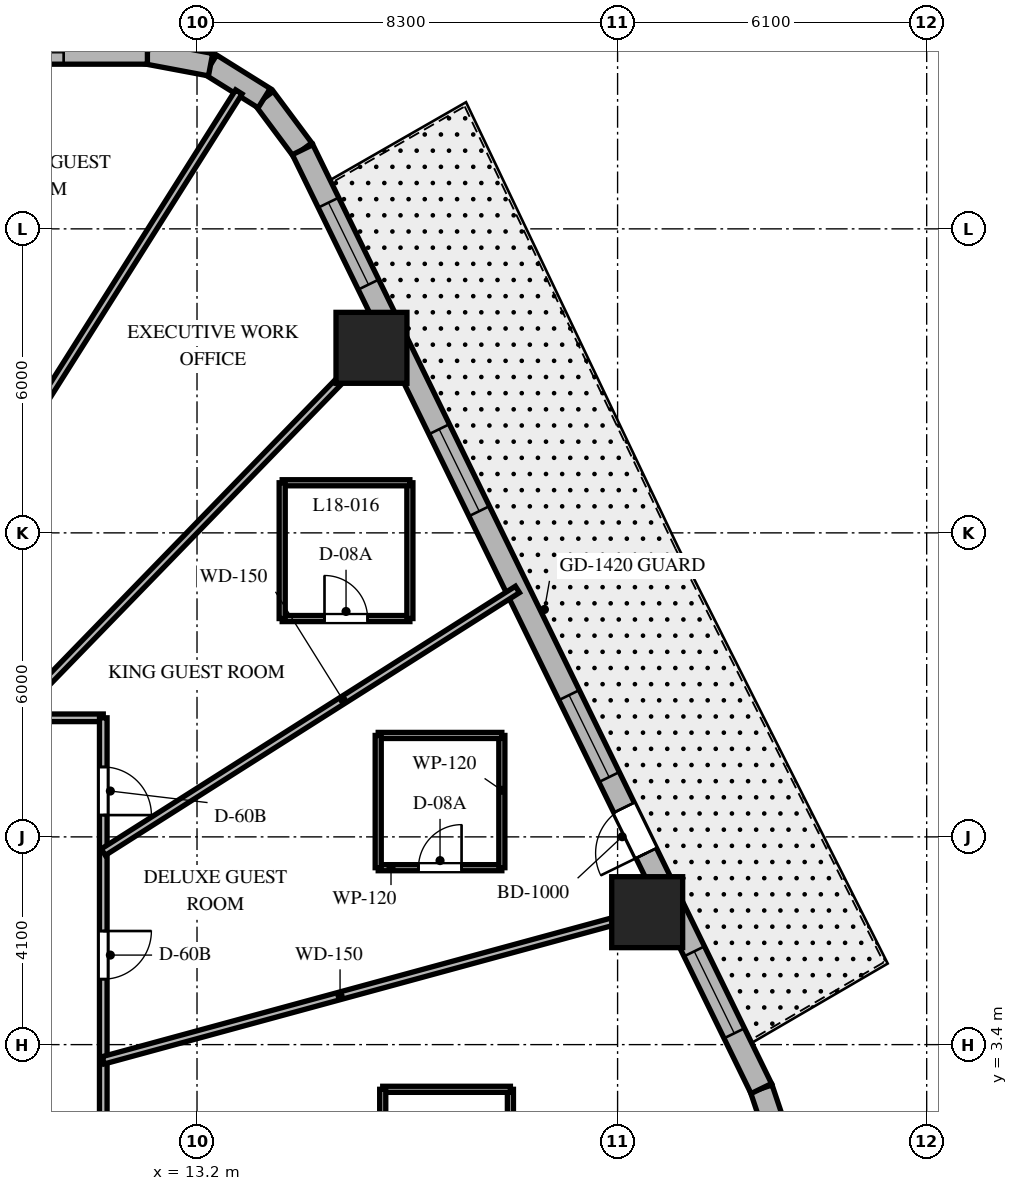
"""IFC4 building model, lengths in metres.
Left out: names, types, materials, properties, quantities, classifications, styles, units other than length and angle.
Written with IfcOpenShell. Run it as: python <this file> out.ifc"""

import sys

from ifc_helpers import new_model, si_unit, direction, frame, frame_2d, origin, origin_2d, place, context, subcontext, project, spatial, rectangle, extrude, element, fill, save


model = new_model("IFC4")
c1 = context("Model", 3, precision=1e-05, world=origin(), true_north=direction((0.0, 1.0)))
c2 = subcontext(c1, "Body", "Model", "MODEL_VIEW")
j1 = project(units=[si_unit("LENGTHUNIT", "METRE"), si_unit("PLANEANGLEUNIT", "RADIAN")], contexts=[c1])
p1 = place(None, origin())
s1 = spatial("IfcSite", under=j1, at=p1, CompositionType="ELEMENT")
p2 = place(p1, origin())
s2 = spatial("IfcBuilding", under=s1, at=p2, CompositionType="ELEMENT")
p3 = place(p2, frame((0.0, 0.0, 78.6)))
s3 = spatial("IfcBuildingStorey", under=s2, at=p3, CompositionType="ELEMENT", Elevation=78.6)
for number, where, z_axis, x_axis in (
    (1, (22.084, 6.014, 0.0), (0.0, 0.0, 1.0), (1.0, 0.0, 0.0)),
    (2, (16.643, 17.152, 0.0), (0.0, 0.0, 1.0), (1.0, 0.0, 0.0)),
):
    element("IfcColumn", number, at=place(p3, frame(where, z_axis=z_axis, x_axis=x_axis)), inside=s3, PredefinedType="COLUMN", context=c2, shape_type="SweptSolid", body=[
        extrude(rectangle(XDim=1.4, YDim=1.4, at=origin_2d()), origin(), (0.0, 0.0, 1.0), 3.7),
    ])
p4 = place(p3, frame((24.621, 1.682, 0.0), z_axis=(0.0, 0.0, 1.0), x_axis=(-0.317697451681, 0.948192137278, 0.0)))
e3 = element("IfcWall", 3, at=p4, inside=s3, PredefinedType="SOLIDWALL", context=c2, shape_type="SweptSolid", body=[
    extrude(rectangle(XDim=0.897, YDim=0.45, at=frame_2d((0.448, 0.0))), origin(), (0.0, 0.0, 1.0), 3.4),
])
p5 = place(p3, frame((15.284, 21.062, 0.0), z_axis=(0.0, 0.0, 1.0), x_axis=(-0.597595366449, 0.801797841104, 0.0)))
e4 = element("IfcWall", 4, at=p5, inside=s3, PredefinedType="SOLIDWALL", context=c2, shape_type="SweptSolid", body=[
    extrude(rectangle(XDim=1.269, YDim=0.45, at=frame_2d((0.634, 0.0))), origin(), (0.0, 0.0, 1.0), 3.4),
])
p6 = place(p3, frame((14.526, 22.08, 0.0), z_axis=(0.0, 0.0, 1.0), x_axis=(-0.848185203596, 0.529699783275, 0.0)))
e5 = element("IfcWall", 5, at=p6, inside=s3, PredefinedType="SOLIDWALL", context=c2, shape_type="SweptSolid", body=[
    extrude(rectangle(XDim=1.247, YDim=0.45, at=frame_2d((0.624, 0.0))), origin(), (0.0, 0.0, 1.0), 3.4),
])
p7 = place(p3, frame((13.468, 22.74, 0.0), z_axis=(0.0, 0.0, 1.0), x_axis=(-0.982717174228, 0.185113358451, 0.0)))
e6 = element("IfcWall", 6, at=p7, inside=s3, PredefinedType="SOLIDWALL", context=c2, shape_type="SweptSolid", body=[
    extrude(rectangle(XDim=1.269, YDim=0.45, at=frame_2d((0.634, 0.0))), origin(), (0.0, 0.0, 1.0), 3.4),
])
p8 = place(p3, frame((24.336, 2.532, 0.0), z_axis=(0.0, 0.0, 1.0), x_axis=(-0.438931326393, 0.898520612291, 0.0)))
e7 = element("IfcWall", 7, at=p8, inside=s3, PredefinedType="SOLIDWALL", context=c2, shape_type="SweptSolid", body=[
    extrude(rectangle(XDim=20.623, YDim=0.45, at=frame_2d((10.312, 0.0))), origin(), (0.0, 0.0, 1.0), 3.4),
])
p9 = place(p8, frame((5.171, 0.0, 0.0)))
e8 = element("IfcOpeningElement", 8, at=p9, cuts=e7, PredefinedType="OPENING", context=c2, shape_type="SweptSolid", body=[
    extrude(rectangle(XDim=1.0, YDim=2.15, at=frame_2d((0.5, 1.075))), frame((0.0, 0.235, 0.0), z_axis=(0.0, -1.0, 0.0), x_axis=(1.0, 0.0, 0.0)), (0.0, 0.0, 1.0), 0.47),
])
p10 = place(p8, frame((6.842, 0.0, 0.8)))
e9 = element("IfcOpeningElement", 9, at=p10, cuts=e7, PredefinedType="OPENING", context=c2, shape_type="SweptSolid", body=[
    extrude(rectangle(XDim=1.8, YDim=1.8, at=frame_2d((0.9, 0.9))), frame((0.0, 0.235, 0.0), z_axis=(0.0, -1.0, 0.0), x_axis=(1.0, 0.0, 0.0)), (0.0, 0.0, 1.0), 0.47),
])
p11 = place(p8, frame((12.683, 0.0, 0.8)))
e10 = element("IfcOpeningElement", 10, at=p11, cuts=e7, PredefinedType="OPENING", context=c2, shape_type="SweptSolid", body=[
    extrude(rectangle(XDim=1.8, YDim=1.8, at=frame_2d((0.9, 0.9))), frame((0.0, 0.235, 0.0), z_axis=(0.0, -1.0, 0.0), x_axis=(1.0, 0.0, 0.0)), (0.0, 0.0, 1.0), 0.47),
])
p12 = place(p8, frame((17.66, 0.0, 0.8)))
e11 = element("IfcOpeningElement", 11, at=p12, cuts=e7, PredefinedType="OPENING", context=c2, shape_type="SweptSolid", body=[
    extrude(rectangle(XDim=1.8, YDim=1.8, at=frame_2d((0.9, 0.9))), frame((0.0, 0.235, 0.0), z_axis=(0.0, -1.0, 0.0), x_axis=(1.0, 0.0, 0.0)), (0.0, 0.0, 1.0), 0.47),
])
p13 = place(p8, frame((1.214, 0.0, 0.8)))
e12 = element("IfcOpeningElement", 12, at=p13, cuts=e7, PredefinedType="OPENING", context=c2, shape_type="SweptSolid", body=[
    extrude(rectangle(XDim=1.8, YDim=1.8, at=frame_2d((0.9, 0.9))), frame((0.0, 0.235, 0.0), z_axis=(0.0, -1.0, 0.0), x_axis=(1.0, 0.0, 0.0)), (0.0, 0.0, 1.0), 0.47),
])
p14 = place(p3, frame((12.221, 22.975, 0.0), z_axis=(0.0, 0.0, 1.0), x_axis=(-1.0, 0.0, 0.0)))
e13 = element("IfcWall", 13, at=p14, inside=s3, PredefinedType="SOLIDWALL", context=c2, shape_type="SweptSolid", body=[
    extrude(rectangle(XDim=26.389, YDim=0.45, at=frame_2d((13.195, 0.0))), origin(), (0.0, 0.0, 1.0), 3.4),
])
p15 = place(p14, frame((1.653, 0.0, 0.8)))
e14 = element("IfcOpeningElement", 14, at=p15, cuts=e13, PredefinedType="OPENING", context=c2, shape_type="SweptSolid", body=[
    extrude(rectangle(XDim=1.8, YDim=1.8, at=frame_2d((0.9, 0.9))), frame((0.0, 0.235, 0.0), z_axis=(0.0, -1.0, 0.0), x_axis=(1.0, 0.0, 0.0)), (0.0, 0.0, 1.0), 0.47),
])
p16 = place(p14, frame((12.296, 0.0, 0.8)))
e15 = element("IfcOpeningElement", 15, at=p16, cuts=e13, PredefinedType="OPENING", context=c2, shape_type="SweptSolid", body=[
    extrude(rectangle(XDim=1.8, YDim=1.8, at=frame_2d((0.9, 0.9))), frame((0.0, 0.235, 0.0), z_axis=(0.0, -1.0, 0.0), x_axis=(1.0, 0.0, 0.0)), (0.0, 0.0, 1.0), 0.47),
])
p17 = place(p14, frame((22.938, 0.0, 0.8)))
e16 = element("IfcOpeningElement", 16, at=p17, cuts=e13, PredefinedType="OPENING", context=c2, shape_type="SweptSolid", body=[
    extrude(rectangle(XDim=1.8, YDim=1.8, at=frame_2d((0.9, 0.9))), frame((0.0, 0.235, 0.0), z_axis=(0.0, -1.0, 0.0), x_axis=(1.0, 0.0, 0.0)), (0.0, 0.0, 1.0), 0.47),
])
p18 = place(p3, frame((-11.35, 9.85, 0.0), z_axis=(0.0, 0.0, 1.0), x_axis=(1.0, 0.0, 0.0)))
e17 = element("IfcWall", 17, at=p18, inside=s3, PredefinedType="PARTITIONING", context=c2, shape_type="SweptSolid", body=[
    extrude(rectangle(XDim=22.7, YDim=0.15, at=frame_2d((11.35, 0.0))), origin(), (0.0, 0.0, 1.0), 2.84),
])
p19 = place(p18, frame((18.837, 0.0, 0.0)))
e18 = element("IfcOpeningElement", 18, at=p19, cuts=e17, PredefinedType="OPENING", context=c2, shape_type="SweptSolid", body=[
    extrude(rectangle(XDim=0.9, YDim=2.03, at=frame_2d((0.45, 1.015))), frame((0.0, 0.085, 0.0), z_axis=(0.0, -1.0, 0.0), x_axis=(1.0, 0.0, 0.0)), (0.0, 0.0, 1.0), 0.17),
])
p20 = place(p18, frame((15.532, 0.0, 0.0)))
e19 = element("IfcOpeningElement", 19, at=p20, cuts=e17, PredefinedType="OPENING", context=c2, shape_type="SweptSolid", body=[
    extrude(rectangle(XDim=0.95, YDim=2.03, at=frame_2d((0.475, 1.015))), frame((0.0, 0.085, 0.0), z_axis=(0.0, -1.0, 0.0), x_axis=(1.0, 0.0, 0.0)), (0.0, 0.0, 1.0), 0.17),
])
p21 = place(p18, frame((10.444, 0.0, 0.0)))
e20 = element("IfcOpeningElement", 20, at=p21, cuts=e17, PredefinedType="OPENING", context=c2, shape_type="SweptSolid", body=[
    extrude(rectangle(XDim=0.95, YDim=2.03, at=frame_2d((0.475, 1.015))), frame((0.0, 0.085, 0.0), z_axis=(0.0, -1.0, 0.0), x_axis=(1.0, 0.0, 0.0)), (0.0, 0.0, 1.0), 0.17),
])
p22 = place(p18, frame((3.369, 0.0, 0.0)))
e21 = element("IfcOpeningElement", 21, at=p22, cuts=e17, PredefinedType="OPENING", context=c2, shape_type="SweptSolid", body=[
    extrude(rectangle(XDim=0.95, YDim=2.03, at=frame_2d((0.475, 1.015))), frame((0.0, 0.085, 0.0), z_axis=(0.0, -1.0, 0.0), x_axis=(1.0, 0.0, 0.0)), (0.0, 0.0, 1.0), 0.17),
])
p23 = place(p3, frame((11.35, 9.85, 0.0), z_axis=(0.0, 0.0, 1.0), x_axis=(0.0, -1.0, 0.0)))
e22 = element("IfcWall", 22, at=p23, inside=s3, PredefinedType="PARTITIONING", context=c2, shape_type="SweptSolid", body=[
    extrude(rectangle(XDim=19.7, YDim=0.15, at=frame_2d((9.85, 0.0))), origin(), (0.0, 0.0, 1.0), 2.84),
])
p24 = place(p23, frame((4.208, 0.0, 0.0)))
e23 = element("IfcOpeningElement", 23, at=p24, cuts=e22, PredefinedType="OPENING", context=c2, shape_type="SweptSolid", body=[
    extrude(rectangle(XDim=0.95, YDim=2.03, at=frame_2d((0.475, 1.015))), frame((0.0, 0.085, 0.0), z_axis=(0.0, -1.0, 0.0), x_axis=(1.0, 0.0, 0.0)), (0.0, 0.0, 1.0), 0.17),
])
p25 = place(p23, frame((0.97, 0.0, 0.0)))
e24 = element("IfcOpeningElement", 24, at=p25, cuts=e22, PredefinedType="OPENING", context=c2, shape_type="SweptSolid", body=[
    extrude(rectangle(XDim=0.95, YDim=2.03, at=frame_2d((0.475, 1.015))), frame((0.0, 0.085, 0.0), z_axis=(0.0, -1.0, 0.0), x_axis=(1.0, 0.0, 0.0)), (0.0, 0.0, 1.0), 0.17),
])
p26 = place(p23, frame((17.181, 0.0, 0.0)))
e25 = element("IfcOpeningElement", 25, at=p26, cuts=e22, PredefinedType="OPENING", context=c2, shape_type="SweptSolid", body=[
    extrude(rectangle(XDim=0.95, YDim=2.03, at=frame_2d((0.475, 1.015))), frame((0.0, 0.085, 0.0), z_axis=(0.0, -1.0, 0.0), x_axis=(1.0, 0.0, 0.0)), (0.0, 0.0, 1.0), 0.17),
])
p27 = place(p23, frame((13.403, 0.0, 0.0)))
e26 = element("IfcOpeningElement", 26, at=p27, cuts=e22, PredefinedType="OPENING", context=c2, shape_type="SweptSolid", body=[
    extrude(rectangle(XDim=0.95, YDim=2.03, at=frame_2d((0.475, 1.015))), frame((0.0, 0.085, 0.0), z_axis=(0.0, -1.0, 0.0), x_axis=(1.0, 0.0, 0.0)), (0.0, 0.0, 1.0), 0.17),
])
p28 = place(p23, frame((8.838, 0.0, 0.0)))
e27 = element("IfcOpeningElement", 27, at=p28, cuts=e22, PredefinedType="OPENING", context=c2, shape_type="SweptSolid", body=[
    extrude(rectangle(XDim=0.95, YDim=2.03, at=frame_2d((0.475, 1.015))), frame((0.0, 0.085, 0.0), z_axis=(0.0, -1.0, 0.0), x_axis=(1.0, 0.0, 0.0)), (0.0, 0.0, 1.0), 0.17),
])
p29 = place(p3, frame((11.35, 3.091, 0.0), z_axis=(0.0, 0.0, 1.0), x_axis=(0.964859685283, 0.262765651704, 0.0)))
e28 = element("IfcWall", 28, at=p29, inside=s3, PredefinedType="PARTITIONING", context=c2, shape_type="SweptSolid", body=[
    extrude(rectangle(XDim=11.629, YDim=0.15, at=frame_2d((5.814, 0.0))), origin(), (0.0, 0.0, 1.0), 2.54),
])
p30 = place(p3, frame((11.35, 7.199, 0.0), z_axis=(0.0, 0.0, 1.0), x_axis=(0.844458213289, 0.535621439087, 0.0)))
e29 = element("IfcWall", 29, at=p30, inside=s3, PredefinedType="PARTITIONING", context=c2, shape_type="SweptSolid", body=[
    extrude(rectangle(XDim=9.679, YDim=0.15, at=frame_2d((4.84, 0.0))), origin(), (0.0, 0.0, 1.0), 2.54),
])
p31 = place(p3, frame((9.558, 9.85, 0.0), z_axis=(0.0, 0.0, 1.0), x_axis=(0.69638346089, 0.717669893056, 0.0)))
e30 = element("IfcWall", 30, at=p31, inside=s3, PredefinedType="PARTITIONING", context=c2, shape_type="SweptSolid", body=[
    extrude(rectangle(XDim=10.701, YDim=0.15, at=frame_2d((5.351, 0.0))), origin(), (0.0, 0.0, 1.0), 2.54),
])
p32 = place(p3, frame((6.222, 9.85, 0.0), z_axis=(0.0, 0.0, 1.0), x_axis=(0.534069056435, 0.845440857162, 0.0)))
e31 = element("IfcWall", 31, at=p32, inside=s3, PredefinedType="PARTITIONING", context=c2, shape_type="SweptSolid", body=[
    extrude(rectangle(XDim=14.611, YDim=0.15, at=frame_2d((7.306, 0.0))), origin(), (0.0, 0.0, 1.0), 2.54),
])
p33 = place(p3, frame((16.776, 6.892, 0.0), z_axis=(0.0, 0.0, 1.0), x_axis=(1.0, 0.0, 0.0)))
e32 = element("IfcWall", 32, at=p33, inside=s3, PredefinedType="PARTITIONING", context=c2, shape_type="SweptSolid", body=[
    extrude(rectangle(XDim=2.44, YDim=0.12, at=frame_2d((1.22, 0.0))), origin(), (0.0, 0.0, 1.0), 2.927),
])
p34 = place(p33, frame((0.795, 0.0, 0.0)))
e33 = element("IfcOpeningElement", 33, at=p34, cuts=e32, PredefinedType="OPENING", context=c2, shape_type="SweptSolid", body=[
    extrude(rectangle(XDim=0.85, YDim=2.03, at=frame_2d((0.425, 1.015))), frame((0.0, 0.07, 0.0), z_axis=(0.0, -1.0, 0.0), x_axis=(1.0, 0.0, 0.0)), (0.0, 0.0, 1.0), 0.14),
])
p35 = place(p3, frame((19.216, 6.892, 0.0), z_axis=(0.0, 0.0, 1.0), x_axis=(0.0, 1.0, 0.0)))
e34 = element("IfcWall", 34, at=p35, inside=s3, PredefinedType="PARTITIONING", context=c2, shape_type="SweptSolid", body=[
    extrude(rectangle(XDim=2.61, YDim=0.12, at=frame_2d((1.305, 0.0))), origin(), (0.0, 0.0, 1.0), 3.4),
])
p36 = place(p3, frame((19.216, 9.502, 0.0), z_axis=(0.0, 0.0, 1.0), x_axis=(-1.0, 0.0, 0.0)))
e35 = element("IfcWall", 35, at=p36, inside=s3, PredefinedType="PARTITIONING", context=c2, shape_type="SweptSolid", body=[
    extrude(rectangle(XDim=2.44, YDim=0.12, at=frame_2d((1.22, 0.0))), origin(), (0.0, 0.0, 1.0), 3.4),
])
p37 = place(p3, frame((16.776, 9.502, 0.0), z_axis=(0.0, 0.0, 1.0), x_axis=(0.0, -1.0, 0.0)))
e36 = element("IfcWall", 36, at=p37, inside=s3, PredefinedType="PARTITIONING", context=c2, shape_type="SweptSolid", body=[
    extrude(rectangle(XDim=2.61, YDim=0.12, at=frame_2d((1.305, 0.0))), origin(), (0.0, 0.0, 1.0), 2.927),
])
p38 = place(p3, frame((14.881, 11.809, 0.0), z_axis=(0.0, 0.0, 1.0), x_axis=(1.0, 0.0, 0.0)))
e37 = element("IfcWall", 37, at=p38, inside=s3, PredefinedType="PARTITIONING", context=c2, shape_type="SweptSolid", body=[
    extrude(rectangle(XDim=2.52, YDim=0.12, at=frame_2d((1.26, 0.0))), origin(), (0.0, 0.0, 1.0), 2.927),
])
p39 = place(p38, frame((0.835, 0.0, 0.0)))
e38 = element("IfcOpeningElement", 38, at=p39, cuts=e37, PredefinedType="OPENING", context=c2, shape_type="SweptSolid", body=[
    extrude(rectangle(XDim=0.85, YDim=2.03, at=frame_2d((0.425, 1.015))), frame((0.0, 0.07, 0.0), z_axis=(0.0, -1.0, 0.0), x_axis=(1.0, 0.0, 0.0)), (0.0, 0.0, 1.0), 0.14),
])
p40 = place(p3, frame((17.401, 11.809, 0.0), z_axis=(0.0, 0.0, 1.0), x_axis=(0.0, 1.0, 0.0)))
e39 = element("IfcWall", 39, at=p40, inside=s3, PredefinedType="PARTITIONING", context=c2, shape_type="SweptSolid", body=[
    extrude(rectangle(XDim=2.68, YDim=0.12, at=frame_2d((1.34, 0.0))), origin(), (0.0, 0.0, 1.0), 3.4),
])
p41 = place(p3, frame((17.401, 14.489, 0.0), z_axis=(0.0, 0.0, 1.0), x_axis=(-1.0, 0.0, 0.0)))
e40 = element("IfcWall", 40, at=p41, inside=s3, PredefinedType="PARTITIONING", context=c2, shape_type="SweptSolid", body=[
    extrude(rectangle(XDim=2.52, YDim=0.12, at=frame_2d((1.26, 0.0))), origin(), (0.0, 0.0, 1.0), 3.4),
])
p42 = place(p3, frame((14.881, 14.489, 0.0), z_axis=(0.0, 0.0, 1.0), x_axis=(0.0, -1.0, 0.0)))
e41 = element("IfcWall", 41, at=p42, inside=s3, PredefinedType="PARTITIONING", context=c2, shape_type="SweptSolid", body=[
    extrude(rectangle(XDim=2.68, YDim=0.12, at=frame_2d((1.34, 0.0))), origin(), (0.0, 0.0, 1.0), 2.927),
])
p43 = place(p3, frame((19.385, -0.162, 0.0), z_axis=(0.0, 0.0, 1.0), x_axis=(0.0, 1.0, 0.0)))
e42 = element("IfcWall", 42, at=p43, inside=s3, PredefinedType="PARTITIONING", context=c2, shape_type="SweptSolid", body=[
    extrude(rectangle(XDim=2.68, YDim=0.12, at=frame_2d((1.34, 0.0))), origin(), (0.0, 0.0, 1.0), 3.4),
])
p44 = place(p3, frame((19.385, 2.518, 0.0), z_axis=(0.0, 0.0, 1.0), x_axis=(-1.0, 0.0, 0.0)))
e43 = element("IfcWall", 43, at=p44, inside=s3, PredefinedType="PARTITIONING", context=c2, shape_type="SweptSolid", body=[
    extrude(rectangle(XDim=2.52, YDim=0.12, at=frame_2d((1.26, 0.0))), origin(), (0.0, 0.0, 1.0), 2.84),
])
p45 = place(p3, frame((16.865, 2.518, 0.0), z_axis=(0.0, 0.0, 1.0), x_axis=(0.0, -1.0, 0.0)))
e44 = element("IfcWall", 44, at=p45, inside=s3, PredefinedType="PARTITIONING", context=c2, shape_type="SweptSolid", body=[
    extrude(rectangle(XDim=2.68, YDim=0.12, at=frame_2d((1.34, 0.0))), origin(), (0.0, 0.0, 1.0), 3.4),
])
p46 = place(p9, origin())
e45 = element("IfcDoor", 45, at=p46, inside=s3, OperationType="SINGLE_SWING_LEFT", PredefinedType="DOOR", context=c2, shape_type="SweptSolid", body=[
    extrude(rectangle(XDim=1.0, YDim=2.15, at=frame_2d((0.5, 1.075))), frame((0.0, 0.025, 0.0), z_axis=(0.0, -1.0, 0.0), x_axis=(1.0, 0.0, 0.0)), (0.0, 0.0, 1.0), 0.05),
])
fill(e8, e45)
p47 = place(p10, origin())
e46 = element("IfcWindow", 46, at=p47, inside=s3, PartitioningType="SINGLE_PANEL", PredefinedType="WINDOW", context=c2, shape_type="SweptSolid", body=[
    extrude(rectangle(XDim=1.8, YDim=1.8, at=frame_2d((0.9, 0.9))), frame((0.0, 0.03, 0.0), z_axis=(0.0, -1.0, 0.0), x_axis=(1.0, 0.0, 0.0)), (0.0, 0.0, 1.0), 0.06),
])
fill(e9, e46)
p48 = place(p11, origin())
e47 = element("IfcWindow", 47, at=p48, inside=s3, PartitioningType="SINGLE_PANEL", PredefinedType="WINDOW", context=c2, shape_type="SweptSolid", body=[
    extrude(rectangle(XDim=1.8, YDim=1.8, at=frame_2d((0.9, 0.9))), frame((0.0, 0.03, 0.0), z_axis=(0.0, -1.0, 0.0), x_axis=(1.0, 0.0, 0.0)), (0.0, 0.0, 1.0), 0.06),
])
fill(e10, e47)
p49 = place(p12, origin())
e48 = element("IfcWindow", 48, at=p49, inside=s3, PartitioningType="SINGLE_PANEL", PredefinedType="WINDOW", context=c2, shape_type="SweptSolid", body=[
    extrude(rectangle(XDim=1.8, YDim=1.8, at=frame_2d((0.9, 0.9))), frame((0.0, 0.03, 0.0), z_axis=(0.0, -1.0, 0.0), x_axis=(1.0, 0.0, 0.0)), (0.0, 0.0, 1.0), 0.06),
])
fill(e11, e48)
p50 = place(p13, origin())
e49 = element("IfcWindow", 49, at=p50, inside=s3, PartitioningType="SINGLE_PANEL", PredefinedType="WINDOW", context=c2, shape_type="SweptSolid", body=[
    extrude(rectangle(XDim=1.8, YDim=1.8, at=frame_2d((0.9, 0.9))), frame((0.0, 0.03, 0.0), z_axis=(0.0, -1.0, 0.0), x_axis=(1.0, 0.0, 0.0)), (0.0, 0.0, 1.0), 0.06),
])
fill(e12, e49)
p51 = place(p15, origin())
e50 = element("IfcWindow", 50, at=p51, inside=s3, PartitioningType="SINGLE_PANEL", PredefinedType="WINDOW", context=c2, shape_type="SweptSolid", body=[
    extrude(rectangle(XDim=1.8, YDim=1.8, at=frame_2d((0.9, 0.9))), frame((0.0, 0.03, 0.0), z_axis=(0.0, -1.0, 0.0), x_axis=(1.0, 0.0, 0.0)), (0.0, 0.0, 1.0), 0.06),
])
fill(e14, e50)
p52 = place(p24, origin())
e51 = element("IfcDoor", 51, at=p52, inside=s3, OperationType="SINGLE_SWING_LEFT", PredefinedType="DOOR", context=c2, shape_type="SweptSolid", body=[
    extrude(rectangle(XDim=0.95, YDim=2.03, at=frame_2d((0.475, 1.015))), frame((0.0, 0.025, 0.0), z_axis=(0.0, -1.0, 0.0), x_axis=(1.0, 0.0, 0.0)), (0.0, 0.0, 1.0), 0.05),
])
fill(e23, e51)
p53 = place(p34, origin())
e52 = element("IfcDoor", 52, at=p53, inside=s3, OperationType="SINGLE_SWING_RIGHT", PredefinedType="DOOR", context=c2, shape_type="SweptSolid", body=[
    extrude(rectangle(XDim=0.85, YDim=2.03, at=frame_2d((0.425, 1.015))), frame((0.0, 0.025, 0.0), z_axis=(0.0, -1.0, 0.0), x_axis=(1.0, 0.0, 0.0)), (0.0, 0.0, 1.0), 0.05),
])
fill(e33, e52)
p54 = place(p25, origin())
e53 = element("IfcDoor", 53, at=p54, inside=s3, OperationType="SINGLE_SWING_RIGHT", PredefinedType="DOOR", context=c2, shape_type="SweptSolid", body=[
    extrude(rectangle(XDim=0.95, YDim=2.03, at=frame_2d((0.475, 1.015))), frame((0.0, 0.025, 0.0), z_axis=(0.0, -1.0, 0.0), x_axis=(1.0, 0.0, 0.0)), (0.0, 0.0, 1.0), 0.05),
])
fill(e24, e53)
p55 = place(p39, origin())
e54 = element("IfcDoor", 54, at=p55, inside=s3, OperationType="SINGLE_SWING_LEFT", PredefinedType="DOOR", context=c2, shape_type="SweptSolid", body=[
    extrude(rectangle(XDim=0.85, YDim=2.03, at=frame_2d((0.425, 1.015))), frame((0.0, 0.025, 0.0), z_axis=(0.0, -1.0, 0.0), x_axis=(1.0, 0.0, 0.0)), (0.0, 0.0, 1.0), 0.05),
])
fill(e38, e54)
save(model, sys.argv[1])
